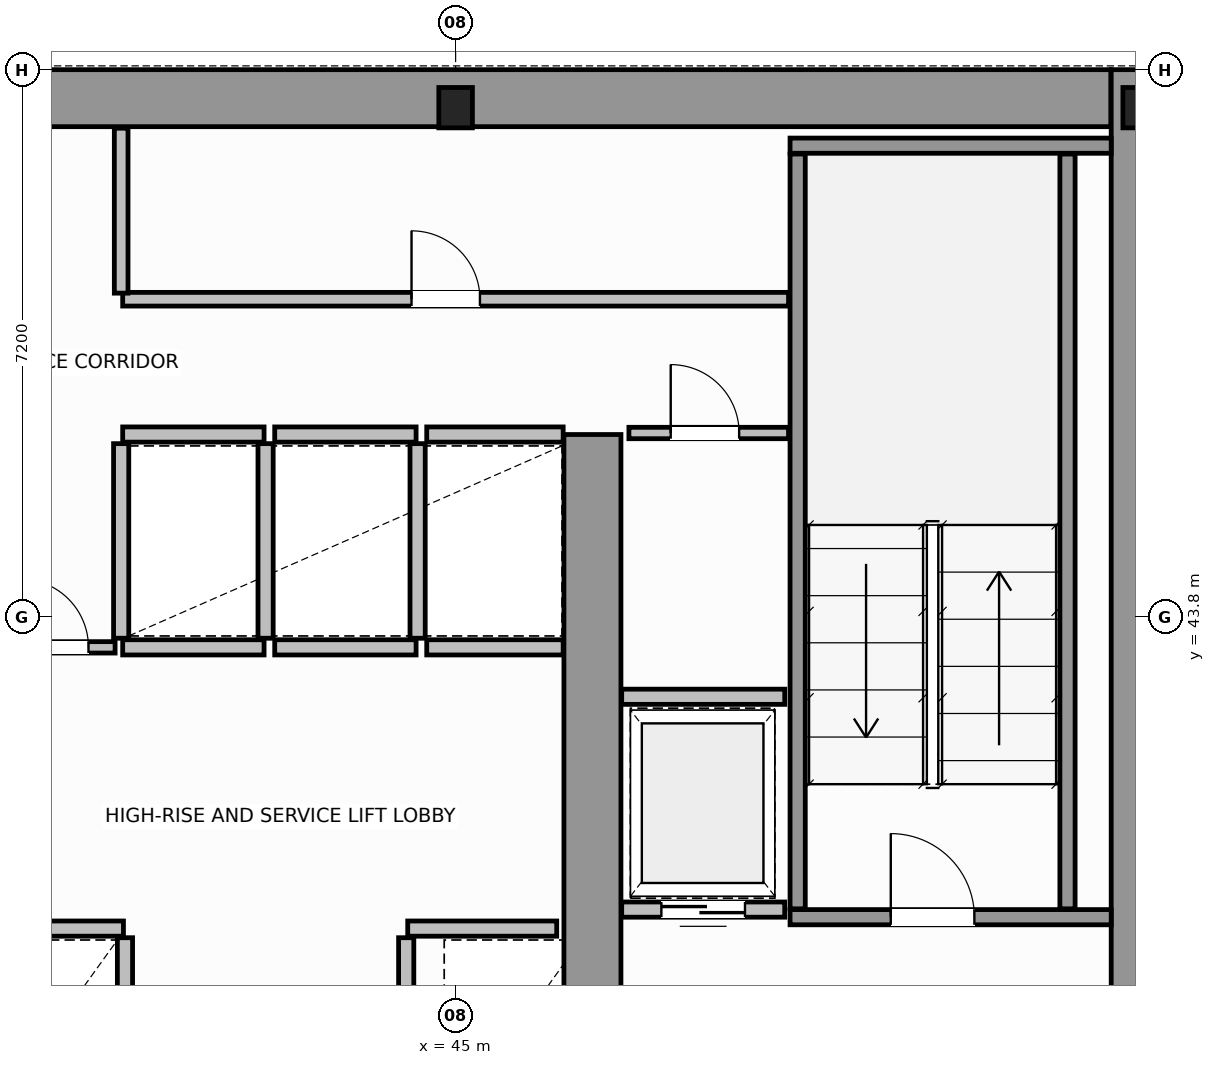
"""IFC4 building model, lengths in metres.
Left out: names, types, materials, properties, quantities, classifications, styles, units other than length and angle.
Written with IfcOpenShell. Run it as: python <this file> out.ifc"""

import sys

from ifc_helpers import new_model, si_unit, direction, frame, frame_2d, origin, origin_2d, place, context, subcontext, project, spatial, rectangle, i_section, extrude, source, transform, mapped, element, fill, save


model = new_model("IFC4")
c1 = context("Model", 3, precision=1e-05, world=origin(), true_north=direction((0.0, 1.0)))
c2 = subcontext(c1, "Body", "Model", "MODEL_VIEW")
j1 = project(units=[si_unit("LENGTHUNIT", "METRE"), si_unit("PLANEANGLEUNIT", "RADIAN")], contexts=[c1])
p1 = place(None, origin())
s1 = spatial("IfcSite", under=j1, at=p1, CompositionType="ELEMENT")
p2 = place(p1, origin())
s2 = spatial("IfcBuilding", under=s1, at=p2, CompositionType="ELEMENT")
p3 = place(p2, frame((0.0, 0.0, 88.2)))
s3 = spatial("IfcBuildingStorey", under=s2, at=p3, CompositionType="ELEMENT", Elevation=88.2)
m1 = source(origin(), c2, "Body", "SweptSolid", [
    extrude(i_section(OverallWidth=0.442, OverallDepth=0.531, WebThickness=0.065, FlangeThickness=0.076, FilletRadius=0.015, at=origin_2d()), origin(), (0.0, 0.0, 1.0), 3.8),
])
for number, where, z_axis, x_axis in (
    (1, (45.0, 50.5, 0.0), (0.0, 0.0, 1.0), (1.0, 0.0, 0.0)),
    (2, (54.0, 50.5, 0.0), (0.0, 0.0, 1.0), (1.0, 0.0, 0.0)),
):
    element("IfcColumn", number, at=place(p3, frame(where, z_axis=z_axis, x_axis=x_axis)), inside=s3, PredefinedType="COLUMN", context=c2, shape_type="MappedRepresentation", body=[
        mapped(m1, transform((0.0, 0.0, 0.0), scale=1.0)),
    ])
p4 = place(p3, frame((34.002, 50.625, 0.0), z_axis=(0.0, 0.0, 1.0), x_axis=(1.0, 0.0, 0.0)))
e3 = element("IfcWall", 3, at=p4, inside=s3, PredefinedType="SHEAR", context=c2, shape_type="SweptSolid", body=[
    extrude(rectangle(XDim=19.619, YDim=0.75, at=frame_2d((9.81, 0.0))), origin(), (0.0, 0.0, 1.0), 3.8),
])
p5 = place(p3, frame((54.0, 36.5, 0.0), z_axis=(0.0, 0.0, 1.0), x_axis=(0.0, 1.0, 0.0)))
e4 = element("IfcWall", 4, at=p5, inside=s3, PredefinedType="SHEAR", context=c2, shape_type="SweptSolid", body=[
    extrude(rectangle(XDim=14.5, YDim=0.75, at=frame_2d((7.25, 0.0))), origin(), (0.0, 0.0, 1.0), 3.8),
])
p6 = place(p3, frame((46.8, 36.895, 0.0), z_axis=(0.0, 0.0, 1.0), x_axis=(0.0, 1.0, 0.0)))
e5 = element("IfcWall", 5, at=p6, inside=s3, PredefinedType="SHEAR", context=c2, shape_type="SweptSolid", body=[
    extrude(rectangle(XDim=9.305, YDim=0.75, at=frame_2d((4.652, 0.0))), origin(), (0.0, 0.0, 1.0), 3.8),
])
p7 = place(p3, frame((49.4, 39.85, 0.0), z_axis=(0.0, 0.0, 1.0), x_axis=(1.0, 0.0, 0.0)))
e6 = element("IfcWall", 6, at=p7, inside=s3, PredefinedType="SOLIDWALL", context=c2, shape_type="SweptSolid", body=[
    extrude(rectangle(XDim=4.225, YDim=0.2, at=frame_2d((2.113, 0.0))), origin(), (0.0, 0.0, 1.0), 3.8),
])
p8 = place(p7, frame((1.325, 0.0, 0.0)))
e7 = element("IfcOpeningElement", 7, at=p8, cuts=e6, PredefinedType="OPENING", context=c2, shape_type="SweptSolid", body=[
    extrude(rectangle(XDim=1.1, YDim=2.15, at=frame_2d((0.55, 1.075))), frame((0.0, 0.11, 0.0), z_axis=(0.0, -1.0, 0.0), x_axis=(1.0, 0.0, 0.0)), (0.0, 0.0, 1.0), 0.22),
])
p9 = place(p3, frame((49.4, 50.0, 0.0), z_axis=(0.0, 0.0, 1.0), x_axis=(1.0, 0.0, 0.0)))
e8 = element("IfcWall", 8, at=p9, inside=s3, PredefinedType="SOLIDWALL", context=c2, shape_type="SweptSolid", body=[
    extrude(rectangle(XDim=4.225, YDim=0.2, at=frame_2d((2.113, 0.0))), origin(), (0.0, 0.0, 1.0), 3.8),
])
for number, where, z_axis, x_axis in (
    (9, (49.5, 39.96, 0.0), (0.0, 0.0, 1.0), (0.0, 1.0, 0.0)),
    (10, (53.05, 39.96, 0.0), (0.0, 0.0, 1.0), (0.0, 1.0, 0.0)),
):
    element("IfcWall", number, at=place(p3, frame(where, z_axis=z_axis, x_axis=x_axis)), inside=s3, PredefinedType="SOLIDWALL", context=c2, shape_type="SweptSolid", body=[
        extrude(rectangle(XDim=9.93, YDim=0.2, at=frame_2d((4.965, 0.0))), origin(), (0.0, 0.0, 1.0), 3.8),
    ])
p10 = place(p3, frame((38.785, 39.7, 0.0), z_axis=(0.0, 0.0, 1.0), x_axis=(1.0, 0.0, 0.0)))
e11 = element("IfcWall", 11, at=p10, inside=s3, PredefinedType="SOLIDWALL", context=c2, shape_type="SweptSolid", body=[
    extrude(rectangle(XDim=1.845, YDim=0.2, at=frame_2d((0.922, 0.0))), origin(), (0.0, 0.0, 1.0), 3.58),
])
p11 = place(p3, frame((40.65, 37.02, 0.0), z_axis=(0.0, 0.0, 1.0), x_axis=(0.0, 1.0, 0.0)))
e12 = element("IfcWall", 12, at=p11, inside=s3, PredefinedType="SOLIDWALL", context=c2, shape_type="SweptSolid", body=[
    extrude(rectangle(XDim=2.56, YDim=0.2, at=frame_2d((1.28, 0.0))), origin(), (0.0, 0.0, 1.0), 3.58),
])
p12 = place(p3, frame((44.37, 39.7, 0.0), z_axis=(0.0, 0.0, 1.0), x_axis=(1.0, 0.0, 0.0)))
e13 = element("IfcWall", 13, at=p12, inside=s3, PredefinedType="SOLIDWALL", context=c2, shape_type="SweptSolid", body=[
    extrude(rectangle(XDim=1.96, YDim=0.2, at=frame_2d((0.98, 0.0))), origin(), (0.0, 0.0, 1.0), 3.58),
])
p13 = place(p3, frame((44.35, 37.02, 0.0), z_axis=(0.0, 0.0, 1.0), x_axis=(0.0, 1.0, 0.0)))
e14 = element("IfcWall", 14, at=p13, inside=s3, PredefinedType="SOLIDWALL", context=c2, shape_type="SweptSolid", body=[
    extrude(rectangle(XDim=2.56, YDim=0.2, at=frame_2d((1.28, 0.0))), origin(), (0.0, 0.0, 1.0), 3.58),
])
for number, where, z_axis, x_axis in (
    (15, (40.62, 43.4, 0.0), (0.0, 0.0, 1.0), (1.0, 0.0, 0.0)),
    (16, (40.62, 46.2, 0.0), (0.0, 0.0, 1.0), (1.0, 0.0, 0.0)),
):
    element("IfcWall", number, at=place(p3, frame(where, z_axis=z_axis, x_axis=x_axis)), inside=s3, PredefinedType="SOLIDWALL", context=c2, shape_type="SweptSolid", body=[
        extrude(rectangle(XDim=1.86, YDim=0.2, at=frame_2d((0.93, 0.0))), origin(), (0.0, 0.0, 1.0), 3.58),
    ])
for number, where, z_axis, x_axis in (
    (17, (40.6, 43.52, 0.0), (0.0, 0.0, 1.0), (0.0, 1.0, 0.0)),
    (18, (42.5, 43.52, 0.0), (0.0, 0.0, 1.0), (0.0, 1.0, 0.0)),
):
    element("IfcWall", number, at=place(p3, frame(where, z_axis=z_axis, x_axis=x_axis)), inside=s3, PredefinedType="SOLIDWALL", context=c2, shape_type="SweptSolid", body=[
        extrude(rectangle(XDim=2.56, YDim=0.2, at=frame_2d((1.28, 0.0))), origin(), (0.0, 0.0, 1.0), 3.58),
    ])
for number, where, z_axis, x_axis in (
    (19, (42.62, 43.4, 0.0), (0.0, 0.0, 1.0), (1.0, 0.0, 0.0)),
    (20, (42.62, 46.2, 0.0), (0.0, 0.0, 1.0), (1.0, 0.0, 0.0)),
):
    element("IfcWall", number, at=place(p3, frame(where, z_axis=z_axis, x_axis=x_axis)), inside=s3, PredefinedType="SOLIDWALL", context=c2, shape_type="SweptSolid", body=[
        extrude(rectangle(XDim=1.86, YDim=0.2, at=frame_2d((0.93, 0.0))), origin(), (0.0, 0.0, 1.0), 3.58),
    ])
p14 = place(p3, frame((44.5, 43.52, 0.0), z_axis=(0.0, 0.0, 1.0), x_axis=(0.0, 1.0, 0.0)))
e21 = element("IfcWall", 21, at=p14, inside=s3, PredefinedType="SOLIDWALL", context=c2, shape_type="SweptSolid", body=[
    extrude(rectangle(XDim=2.56, YDim=0.2, at=frame_2d((1.28, 0.0))), origin(), (0.0, 0.0, 1.0), 3.58),
])
for number, where, z_axis, x_axis in (
    (22, (44.62, 43.4, 0.0), (0.0, 0.0, 1.0), (1.0, 0.0, 0.0)),
    (23, (44.62, 46.2, 0.0), (0.0, 0.0, 1.0), (1.0, 0.0, 0.0)),
):
    element("IfcWall", number, at=place(p3, frame(where, z_axis=z_axis, x_axis=x_axis)), inside=s3, PredefinedType="SOLIDWALL", context=c2, shape_type="SweptSolid", body=[
        extrude(rectangle(XDim=1.795, YDim=0.2, at=frame_2d((0.897, 0.0))), origin(), (0.0, 0.0, 1.0), 3.58),
    ])
p15 = place(p3, frame((47.185, 39.95, 0.0), z_axis=(0.0, 0.0, 1.0), x_axis=(1.0, 0.0, 0.0)))
e24 = element("IfcWall", 24, at=p15, inside=s3, PredefinedType="SOLIDWALL", context=c2, shape_type="SweptSolid", body=[
    extrude(rectangle(XDim=2.145, YDim=0.2, at=frame_2d((1.073, 0.0))), origin(), (0.0, 0.0, 1.0), 3.58),
])
p16 = place(p15, frame((0.522, 0.0, 0.0)))
e25 = element("IfcOpeningElement", 25, at=p16, cuts=e24, PredefinedType="OPENING", context=c2, shape_type="SweptSolid", body=[
    extrude(rectangle(XDim=1.1, YDim=2.15, at=frame_2d((0.55, 1.075))), frame((0.0, 0.11, 0.0), z_axis=(0.0, -1.0, 0.0), x_axis=(1.0, 0.0, 0.0)), (0.0, 0.0, 1.0), 0.22),
])
p17 = place(p3, frame((47.185, 42.75, 0.0), z_axis=(0.0, 0.0, 1.0), x_axis=(1.0, 0.0, 0.0)))
e26 = element("IfcWall", 26, at=p17, inside=s3, PredefinedType="SOLIDWALL", context=c2, shape_type="SweptSolid", body=[
    extrude(rectangle(XDim=2.145, YDim=0.2, at=frame_2d((1.073, 0.0))), origin(), (0.0, 0.0, 1.0), 3.58),
])
p18 = place(p3, frame((47.28, 46.22, 0.0), z_axis=(0.0, 0.0, 1.0), x_axis=(1.0, 0.0, 0.0)))
e27 = element("IfcWall", 27, at=p18, inside=s3, PredefinedType="PARTITIONING", context=c2, shape_type="SweptSolid", body=[
    extrude(rectangle(XDim=2.1, YDim=0.15, at=frame_2d((1.05, 0.0))), origin(), (0.0, 0.0, 1.0), 3.58),
])
p19 = place(p18, frame((0.55, 0.0, 0.0)))
e28 = element("IfcOpeningElement", 28, at=p19, cuts=e27, PredefinedType="OPENING", context=c2, shape_type="SweptSolid", body=[
    extrude(rectangle(XDim=0.9, YDim=2.1, at=frame_2d((0.45, 1.05))), frame((0.0, 0.085, 0.0), z_axis=(0.0, -1.0, 0.0), x_axis=(1.0, 0.0, 0.0)), (0.0, 0.0, 1.0), 0.17),
])
p20 = place(p3, frame((38.92, 43.4, 0.0), z_axis=(0.0, 0.0, 1.0), x_axis=(1.0, 0.0, 0.0)))
e29 = element("IfcWall", 29, at=p20, inside=s3, PredefinedType="PARTITIONING", context=c2, shape_type="SweptSolid", body=[
    extrude(rectangle(XDim=1.6, YDim=0.15, at=frame_2d((0.8, 0.0))), origin(), (0.0, 0.0, 1.0), 3.58),
])
p21 = place(p20, frame((0.35, 0.0, 0.0)))
e30 = element("IfcOpeningElement", 30, at=p21, cuts=e29, PredefinedType="OPENING", context=c2, shape_type="SweptSolid", body=[
    extrude(rectangle(XDim=0.9, YDim=2.1, at=frame_2d((0.45, 1.05))), frame((0.0, 0.085, 0.0), z_axis=(0.0, -1.0, 0.0), x_axis=(1.0, 0.0, 0.0)), (0.0, 0.0, 1.0), 0.17),
])
p22 = place(p3, frame((40.62, 47.98, 0.0), z_axis=(0.0, 0.0, 1.0), x_axis=(1.0, 0.0, 0.0)))
e31 = element("IfcWall", 31, at=p22, inside=s3, PredefinedType="PLUMBINGWALL", context=c2, shape_type="SweptSolid", body=[
    extrude(rectangle(XDim=8.76, YDim=0.18, at=frame_2d((4.38, 0.0))), origin(), (0.0, 0.0, 1.0), 3.58),
])
p23 = place(p22, frame((3.8, 0.0, 0.0)))
e32 = element("IfcOpeningElement", 32, at=p23, cuts=e31, PredefinedType="OPENING", context=c2, shape_type="SweptSolid", body=[
    extrude(rectangle(XDim=0.9, YDim=2.15, at=frame_2d((0.45, 1.075))), frame((0.0, 0.1, 0.0), z_axis=(0.0, -1.0, 0.0), x_axis=(1.0, 0.0, 0.0)), (0.0, 0.0, 1.0), 0.2),
])
p24 = place(p3, frame((40.6, 48.06, 0.0), z_axis=(0.0, 0.0, 1.0), x_axis=(0.0, 1.0, 0.0)))
e33 = element("IfcWall", 33, at=p24, inside=s3, PredefinedType="PLUMBINGWALL", context=c2, shape_type="SweptSolid", body=[
    extrude(rectangle(XDim=2.17, YDim=0.18, at=frame_2d((1.085, 0.0))), origin(), (0.0, 0.0, 1.0), 3.58),
])
m2 = source(origin(), c2, "Body", "SweptSolid", [
    extrude(rectangle(XDim=1.1, YDim=2.15, at=frame_2d((0.55, 1.075))), frame((0.0, 0.025, 0.0), z_axis=(0.0, -1.0, 0.0), x_axis=(1.0, 0.0, 0.0)), (0.0, 0.0, 1.0), 0.05),
])
p25 = place(p8, origin())
e34 = element("IfcDoor", 34, at=p25, inside=s3, OperationType="SINGLE_SWING_RIGHT", PredefinedType="DOOR", context=c2, shape_type="MappedRepresentation", body=[
    mapped(m2, transform((0.0, 0.0, 0.0), scale=1.0)),
])
fill(e7, e34)
p26 = place(p16, origin())
e35 = element("IfcDoor", 35, at=p26, inside=s3, OperationType="DOUBLE_DOOR_SLIDING", PredefinedType="DOOR", context=c2, shape_type="MappedRepresentation", body=[
    mapped(m2, transform((0.0, 0.0, 0.0), scale=1.0)),
])
fill(e25, e35)
m3 = source(origin(), c2, "Body", "SweptSolid", [
    extrude(rectangle(XDim=0.9, YDim=2.1, at=frame_2d((0.45, 1.05))), frame((0.0, 0.025, 0.0), z_axis=(0.0, -1.0, 0.0), x_axis=(1.0, 0.0, 0.0)), (0.0, 0.0, 1.0), 0.05),
])
p27 = place(p19, origin())
e36 = element("IfcDoor", 36, at=p27, inside=s3, OperationType="SINGLE_SWING_RIGHT", PredefinedType="DOOR", context=c2, shape_type="MappedRepresentation", body=[
    mapped(m3, transform((0.0, 0.0, 0.0), scale=1.0)),
])
fill(e28, e36)
p28 = place(p21, origin())
e37 = element("IfcDoor", 37, at=p28, inside=s3, OperationType="SINGLE_SWING_LEFT", PredefinedType="DOOR", context=c2, shape_type="MappedRepresentation", body=[
    mapped(m3, transform((0.0, 0.0, 0.0), scale=1.0)),
])
fill(e30, e37)
m4 = source(origin(), c2, "Body", "SweptSolid", [
    extrude(rectangle(XDim=0.9, YDim=2.15, at=frame_2d((0.45, 1.075))), frame((0.0, 0.025, 0.0), z_axis=(0.0, -1.0, 0.0), x_axis=(1.0, 0.0, 0.0)), (0.0, 0.0, 1.0), 0.05),
])
p29 = place(p23, origin())
e38 = element("IfcDoor", 38, at=p29, inside=s3, OperationType="SINGLE_SWING_RIGHT", PredefinedType="DOOR", context=c2, shape_type="MappedRepresentation", body=[
    mapped(m4, transform((0.0, 0.0, 0.0), scale=1.0)),
])
fill(e32, e38)
save(model, sys.argv[1])
